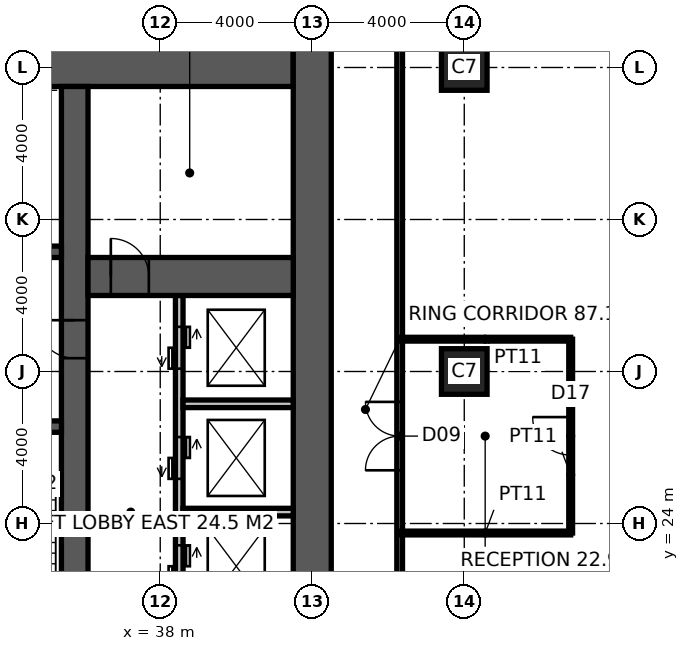
"""IFC4 building model, lengths in metres.
Left out: names, types, materials, properties, quantities, classifications, styles, units other than length and angle.
Written with IfcOpenShell. Run it as: python <this file> out.ifc"""

import sys

from ifc_helpers import new_model, si_unit, direction, frame, frame_2d, origin, origin_2d, place, context, subcontext, project, spatial, rectangle, hollow_rectangle, extrude, element, fill, save


model = new_model("IFC4")
c1 = context("Model", 3, precision=1e-05, world=origin(), true_north=direction((0.0, 1.0)))
c2 = subcontext(c1, "Body", "Model", "MODEL_VIEW")
j1 = project(units=[si_unit("LENGTHUNIT", "METRE"), si_unit("PLANEANGLEUNIT", "RADIAN")], contexts=[c1])
p1 = place(None, origin())
s1 = spatial("IfcSite", under=j1, at=p1, CompositionType="ELEMENT")
p2 = place(p1, origin())
s2 = spatial("IfcBuilding", under=s1, at=p2, CompositionType="ELEMENT")
p3 = place(p2, frame((0.0, 0.0, 27.0)))
s3 = spatial("IfcBuildingStorey", under=s2, at=p3, CompositionType="ELEMENT", Elevation=27.0)
for number, where, z_axis, x_axis in (
    (1, (46.0, 28.0, 0.0), (0.0, 0.0, 1.0), (1.0, 0.0, 0.0)),
    (2, (46.0, 36.0, 0.0), (0.0, 0.0, 1.0), (1.0, 0.0, 0.0)),
):
    element("IfcColumn", number, at=place(p3, frame(where, z_axis=z_axis, x_axis=x_axis)), inside=s3, PredefinedType="COLUMN", context=c2, shape_type="SweptSolid", body=[
        extrude(hollow_rectangle(XDim=1.2, YDim=1.2, WallThickness=0.1, at=origin_2d()), origin(), (0.0, 0.0, 1.0), 4.0),
    ])
p4 = place(p3, frame((18.5, 36.2, -0.15), z_axis=(0.0, 0.0, 1.0), x_axis=(1.0, 0.0, 0.0)))
e3 = element("IfcWall", 3, at=p4, inside=s3, PredefinedType="SHEAR", context=c2, shape_type="SweptSolid", body=[
    extrude(rectangle(XDim=23.0, YDim=1.4, at=frame_2d((11.5, 0.0))), origin(), (0.0, 0.0, 1.0), 4.0),
])
p5 = place(p3, frame((42.0, 17.1, -0.15), z_axis=(0.0, 0.0, 1.0), x_axis=(0.0, 1.0, 0.0)))
e4 = element("IfcWall", 4, at=p5, inside=s3, PredefinedType="SHEAR", context=c2, shape_type="SweptSolid", body=[
    extrude(rectangle(XDim=19.8, YDim=1.0, at=frame_2d((9.9, 0.0))), origin(), (0.0, 0.0, 1.0), 4.0),
])
p6 = place(p3, frame((35.75, 18.5, -0.15), z_axis=(0.0, 0.0, 1.0), x_axis=(0.0, 1.0, 0.0)))
e5 = element("IfcWall", 5, at=p6, inside=s3, PredefinedType="SHEAR", context=c2, shape_type="SweptSolid", body=[
    extrude(rectangle(XDim=17.0, YDim=0.7, at=frame_2d((8.5, 0.0))), origin(), (0.0, 0.0, 1.0), 4.0),
])
p7 = place(p6, frame((9.85, 0.0, 0.15)))
e6 = element("IfcOpeningElement", 6, at=p7, cuts=e5, PredefinedType="OPENING", context=c2, shape_type="SweptSolid", body=[
    extrude(rectangle(XDim=1.0, YDim=2.2, at=frame_2d((0.5, 1.1))), frame((0.0, 0.36, 0.0), z_axis=(0.0, -1.0, 0.0), x_axis=(1.0, 0.0, 0.0)), (0.0, 0.0, 1.0), 0.72),
])
p8 = place(p3, frame((24.15, 26.55, -0.15), z_axis=(0.0, 0.0, 1.0), x_axis=(1.0, 0.0, 0.0)))
e7 = element("IfcWall", 7, at=p8, inside=s3, PredefinedType="SHEAR", context=c2, shape_type="SweptSolid", body=[
    extrude(rectangle(XDim=11.25, YDim=0.3, at=frame_2d((5.625, 0.0))), origin(), (0.0, 0.0, 1.0), 4.0),
])
p9 = place(p8, frame((9.25, 0.0, 0.15)))
e8 = element("IfcOpeningElement", 8, at=p9, cuts=e7, PredefinedType="OPENING", context=c2, shape_type="SweptSolid", body=[
    extrude(rectangle(XDim=1.0, YDim=2.2, at=frame_2d((0.5, 1.1))), frame((0.0, 0.16, 0.0), z_axis=(0.0, -1.0, 0.0), x_axis=(1.0, 0.0, 0.0)), (0.0, 0.0, 1.0), 0.32),
])
p10 = place(p8, frame((4.9, 0.0, 0.15)))
e9 = element("IfcOpeningElement", 9, at=p10, cuts=e7, PredefinedType="OPENING", context=c2, shape_type="SweptSolid", body=[
    extrude(rectangle(XDim=1.5, YDim=2.4, at=frame_2d((0.75, 1.2))), frame((0.0, 0.16, 0.0), z_axis=(0.0, -1.0, 0.0), x_axis=(1.0, 0.0, 0.0)), (0.0, 0.0, 1.0), 0.32),
])
p11 = place(p3, frame((24.15, 31.15, -0.15), z_axis=(0.0, 0.0, 1.0), x_axis=(1.0, 0.0, 0.0)))
e10 = element("IfcWall", 10, at=p11, inside=s3, PredefinedType="SHEAR", context=c2, shape_type="SweptSolid", body=[
    extrude(rectangle(XDim=11.25, YDim=0.3, at=frame_2d((5.625, 0.0))), origin(), (0.0, 0.0, 1.0), 4.0),
])
p12 = place(p11, frame((7.25, 0.0, 0.15)))
e11 = element("IfcOpeningElement", 11, at=p12, cuts=e10, PredefinedType="OPENING", context=c2, shape_type="SweptSolid", body=[
    extrude(rectangle(XDim=1.4, YDim=2.4, at=frame_2d((0.7, 1.2))), frame((0.0, 0.16, 0.0), z_axis=(0.0, -1.0, 0.0), x_axis=(1.0, 0.0, 0.0)), (0.0, 0.0, 1.0), 0.32),
])
p13 = place(p3, frame((38.5, 18.5, -0.15), z_axis=(0.0, 0.0, 1.0), x_axis=(0.0, 1.0, 0.0)))
e12 = element("IfcWall", 12, at=p13, inside=s3, PredefinedType="SOLIDWALL", context=c2, shape_type="SweptSolid", body=[
    extrude(rectangle(XDim=11.5, YDim=0.2, at=frame_2d((5.75, 0.0))), origin(), (0.0, 0.0, 1.0), 4.0),
])
p14 = place(p13, frame((0.875, 0.0, 0.15)))
e13 = element("IfcOpeningElement", 13, at=p14, cuts=e12, PredefinedType="OPENING", context=c2, shape_type="SweptSolid", body=[
    extrude(rectangle(XDim=1.1, YDim=2.2, at=frame_2d((0.55, 1.1))), frame((0.0, 0.11, 0.0), z_axis=(0.0, -1.0, 0.0), x_axis=(1.0, 0.0, 0.0)), (0.0, 0.0, 1.0), 0.22),
])
p15 = place(p13, frame((3.825, 0.0, 0.15)))
e14 = element("IfcOpeningElement", 14, at=p15, cuts=e12, PredefinedType="OPENING", context=c2, shape_type="SweptSolid", body=[
    extrude(rectangle(XDim=1.1, YDim=2.2, at=frame_2d((0.55, 1.1))), frame((0.0, 0.11, 0.0), z_axis=(0.0, -1.0, 0.0), x_axis=(1.0, 0.0, 0.0)), (0.0, 0.0, 1.0), 0.22),
])
p16 = place(p13, frame((6.675, 0.0, 0.15)))
e15 = element("IfcOpeningElement", 15, at=p16, cuts=e12, PredefinedType="OPENING", context=c2, shape_type="SweptSolid", body=[
    extrude(rectangle(XDim=1.1, YDim=2.2, at=frame_2d((0.55, 1.1))), frame((0.0, 0.11, 0.0), z_axis=(0.0, -1.0, 0.0), x_axis=(1.0, 0.0, 0.0)), (0.0, 0.0, 1.0), 0.22),
])
p17 = place(p13, frame((9.575, 0.0, 0.15)))
e16 = element("IfcOpeningElement", 16, at=p17, cuts=e12, PredefinedType="OPENING", context=c2, shape_type="SweptSolid", body=[
    extrude(rectangle(XDim=1.1, YDim=2.2, at=frame_2d((0.55, 1.1))), frame((0.0, 0.11, 0.0), z_axis=(0.0, -1.0, 0.0), x_axis=(1.0, 0.0, 0.0)), (0.0, 0.0, 1.0), 0.22),
])
p18 = place(p3, frame((36.1, 30.5, -0.15), z_axis=(0.0, 0.0, 1.0), x_axis=(1.0, 0.0, 0.0)))
e17 = element("IfcWall", 17, at=p18, inside=s3, PredefinedType="SHEAR", context=c2, shape_type="SweptSolid", body=[
    extrude(rectangle(XDim=5.4, YDim=1.0, at=frame_2d((2.7, 0.0))), origin(), (0.0, 0.0, 1.0), 4.0),
])
p19 = place(p18, frame((0.6, 0.0, 0.15)))
e18 = element("IfcOpeningElement", 18, at=p19, cuts=e17, PredefinedType="OPENING", context=c2, shape_type="SweptSolid", body=[
    extrude(rectangle(XDim=1.0, YDim=2.2, at=frame_2d((0.5, 1.1))), frame((0.0, 0.51, 0.0), z_axis=(0.0, -1.0, 0.0), x_axis=(1.0, 0.0, 0.0)), (0.0, 0.0, 1.0), 1.02),
])
for number, where, z_axis, x_axis in (
    (19, (38.6, 24.3, -0.15), (0.0, 0.0, 1.0), (1.0, 0.0, 0.0)),
    (20, (38.6, 27.15, -0.15), (0.0, 0.0, 1.0), (1.0, 0.0, 0.0)),
):
    element("IfcWall", number, at=place(p3, frame(where, z_axis=z_axis, x_axis=x_axis)), inside=s3, PredefinedType="SOLIDWALL", context=c2, shape_type="SweptSolid", body=[
        extrude(rectangle(XDim=2.9, YDim=0.2, at=frame_2d((1.45, 0.0))), origin(), (0.0, 0.0, 1.0), 4.0),
    ])
p20 = place(p3, frame((44.3, 15.225, 0.0), z_axis=(0.0, 0.0, 1.0), x_axis=(0.0, 1.0, 0.0)))
e21 = element("IfcWall", 21, at=p20, inside=s3, PredefinedType="PARTITIONING", context=c2, shape_type="SweptSolid", body=[
    extrude(rectangle(XDim=23.55, YDim=0.15, at=frame_2d((11.775, 0.0))), origin(), (0.0, 0.0, 1.0), 3.85),
])
p21 = place(p20, frame((10.175, 0.0, 0.0)))
e22 = element("IfcOpeningElement", 22, at=p21, cuts=e21, PredefinedType="OPENING", context=c2, shape_type="SweptSolid", body=[
    extrude(rectangle(XDim=1.8, YDim=2.4, at=frame_2d((0.9, 1.2))), frame((0.0, 0.085, 0.0), z_axis=(0.0, -1.0, 0.0), x_axis=(1.0, 0.0, 0.0)), (0.0, 0.0, 1.0), 0.17),
])
p22 = place(p3, frame((44.3, 23.75, 0.0), z_axis=(0.0, 0.0, 1.0), x_axis=(1.0, 0.0, 0.0)))
e23 = element("IfcWall", 23, at=p22, inside=s3, PredefinedType="PARTITIONING", context=c2, shape_type="SweptSolid", body=[
    extrude(rectangle(XDim=4.5, YDim=0.1, at=frame_2d((2.25, 0.0))), origin(), (0.0, 0.0, 1.0), 3.85),
])
p23 = place(p3, frame((48.8, 23.75, 0.0), z_axis=(0.0, 0.0, 1.0), x_axis=(0.0, 1.0, 0.0)))
e24 = element("IfcWall", 24, at=p23, inside=s3, PredefinedType="PARTITIONING", context=c2, shape_type="SweptSolid", body=[
    extrude(rectangle(XDim=5.1, YDim=0.1, at=frame_2d((2.55, 0.0))), origin(), (0.0, 0.0, 1.0), 3.85),
])
p24 = place(p23, frame((2.05, 0.0, 0.0)))
e25 = element("IfcOpeningElement", 25, at=p24, cuts=e24, PredefinedType="OPENING", context=c2, shape_type="SweptSolid", body=[
    extrude(rectangle(XDim=1.0, YDim=2.2, at=frame_2d((0.5, 1.1))), frame((0.0, 0.06, 0.0), z_axis=(0.0, -1.0, 0.0), x_axis=(1.0, 0.0, 0.0)), (0.0, 0.0, 1.0), 0.12),
])
p25 = place(p3, frame((48.8, 28.85, 0.0), z_axis=(0.0, 0.0, 1.0), x_axis=(-1.0, 0.0, 0.0)))
e26 = element("IfcWall", 26, at=p25, inside=s3, PredefinedType="PARTITIONING", context=c2, shape_type="SweptSolid", body=[
    extrude(rectangle(XDim=4.5, YDim=0.1, at=frame_2d((2.25, 0.0))), origin(), (0.0, 0.0, 1.0), 3.85),
])
p26 = place(p7, origin())
e27 = element("IfcDoor", 27, at=p26, inside=s3, OperationType="SINGLE_SWING_RIGHT", PredefinedType="DOOR", context=c2, shape_type="SweptSolid", body=[
    extrude(rectangle(XDim=1.0, YDim=2.2, at=frame_2d((0.5, 1.1))), frame((0.0, 0.025, 0.0), z_axis=(0.0, -1.0, 0.0), x_axis=(1.0, 0.0, 0.0)), (0.0, 0.0, 1.0), 0.05),
])
fill(e6, e27)
p27 = place(p19, origin())
e28 = element("IfcDoor", 28, at=p27, inside=s3, OperationType="SINGLE_SWING_LEFT", PredefinedType="DOOR", context=c2, shape_type="SweptSolid", body=[
    extrude(rectangle(XDim=1.0, YDim=2.2, at=frame_2d((0.5, 1.1))), frame((0.0, 0.025, 0.0), z_axis=(0.0, -1.0, 0.0), x_axis=(1.0, 0.0, 0.0)), (0.0, 0.0, 1.0), 0.05),
])
fill(e18, e28)
p28 = place(p21, origin())
e29 = element("IfcDoor", 29, at=p28, inside=s3, OperationType="DOUBLE_DOOR_DOUBLE_SWING", PredefinedType="DOOR", context=c2, shape_type="SweptSolid", body=[
    extrude(rectangle(XDim=1.8, YDim=2.4, at=frame_2d((0.9, 1.2))), frame((0.0, 0.025, 0.0), z_axis=(0.0, -1.0, 0.0), x_axis=(1.0, 0.0, 0.0)), (0.0, 0.0, 1.0), 0.05),
])
fill(e22, e29)
p29 = place(p24, origin())
e30 = element("IfcDoor", 30, at=p29, inside=s3, OperationType="SINGLE_SWING_RIGHT", PredefinedType="DOOR", context=c2, shape_type="SweptSolid", body=[
    extrude(rectangle(XDim=1.0, YDim=2.2, at=frame_2d((0.5, 1.1))), frame((0.0, 0.025, 0.0), z_axis=(0.0, -1.0, 0.0), x_axis=(1.0, 0.0, 0.0)), (0.0, 0.0, 1.0), 0.05),
])
fill(e25, e30)
p30 = place(p15, origin())
e31 = element("IfcDoor", 31, at=p30, inside=s3, OperationType="DOUBLE_DOOR_SLIDING", PredefinedType="DOOR", context=c2, shape_type="SweptSolid", body=[
    extrude(rectangle(XDim=1.1, YDim=2.2, at=frame_2d((0.55, 1.1))), frame((0.0, 0.025, 0.0), z_axis=(0.0, -1.0, 0.0), x_axis=(1.0, 0.0, 0.0)), (0.0, 0.0, 1.0), 0.05),
])
fill(e14, e31)
p31 = place(p16, origin())
e32 = element("IfcDoor", 32, at=p31, inside=s3, OperationType="DOUBLE_DOOR_SLIDING", PredefinedType="DOOR", context=c2, shape_type="SweptSolid", body=[
    extrude(rectangle(XDim=1.1, YDim=2.2, at=frame_2d((0.55, 1.1))), frame((0.0, 0.025, 0.0), z_axis=(0.0, -1.0, 0.0), x_axis=(1.0, 0.0, 0.0)), (0.0, 0.0, 1.0), 0.05),
])
fill(e15, e32)
p32 = place(p17, origin())
e33 = element("IfcDoor", 33, at=p32, inside=s3, OperationType="DOUBLE_DOOR_SLIDING", PredefinedType="DOOR", context=c2, shape_type="SweptSolid", body=[
    extrude(rectangle(XDim=1.1, YDim=2.2, at=frame_2d((0.55, 1.1))), frame((0.0, 0.025, 0.0), z_axis=(0.0, -1.0, 0.0), x_axis=(1.0, 0.0, 0.0)), (0.0, 0.0, 1.0), 0.05),
])
fill(e16, e33)
save(model, sys.argv[1])
